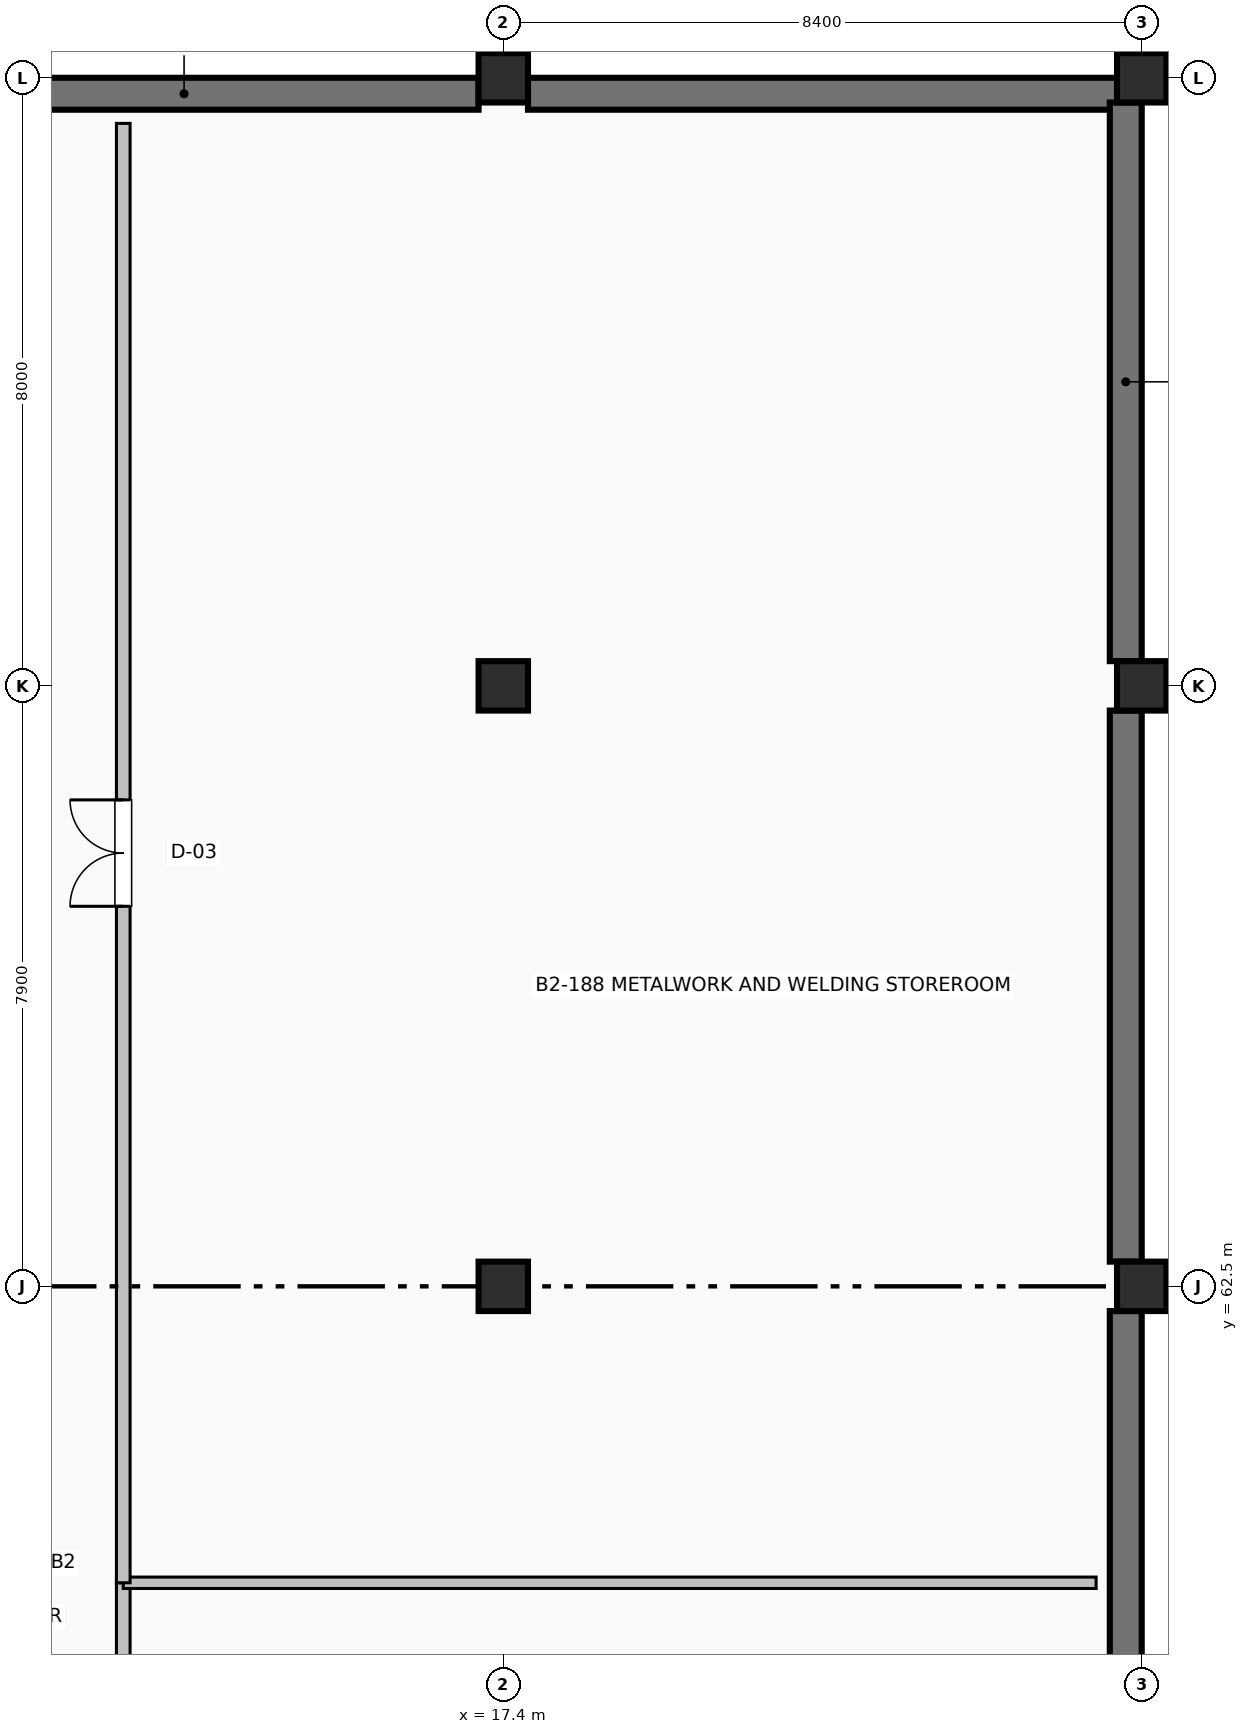
"""IFC4 building model, lengths in metres.
Left out: names, types, materials, properties, quantities, classifications, styles, units other than length and angle.
Written with IfcOpenShell. Run it as: python <this file> out.ifc"""

import sys

from ifc_helpers import new_model, si_unit, direction, frame, frame_2d, origin, origin_2d, place, context, subcontext, project, spatial, rectangle, extrude, element, fill, save


model = new_model("IFC4")
c1 = context("Model", 3, precision=1e-05, world=origin(), true_north=direction((0.0, 1.0)))
c2 = subcontext(c1, "Body", "Model", "MODEL_VIEW")
j1 = project(units=[si_unit("LENGTHUNIT", "METRE"), si_unit("PLANEANGLEUNIT", "RADIAN")], contexts=[c1])
p1 = place(None, origin())
s1 = spatial("IfcSite", under=j1, at=p1, CompositionType="ELEMENT")
p2 = place(p1, origin())
s2 = spatial("IfcBuilding", under=s1, at=p2, CompositionType="ELEMENT")
p3 = place(p2, frame((0.0, 0.0, -9.6)))
s3 = spatial("IfcBuildingStorey", under=s2, at=p3, CompositionType="ELEMENT", Elevation=-9.6)
for number, where, z_axis, x_axis in (
    (1, (17.4, 62.5, 0.0), (0.0, 0.0, 1.0), (1.0, 0.0, 0.0)),
    (2, (17.4, 70.4, 0.0), (0.0, 0.0, 1.0), (1.0, 0.0, 0.0)),
    (3, (17.4, 78.4, 0.0), (0.0, 0.0, 1.0), (1.0, 0.0, 0.0)),
    (4, (25.8, 62.5, 0.0), (0.0, 0.0, 1.0), (1.0, 0.0, 0.0)),
    (5, (25.8, 70.4, 0.0), (0.0, 0.0, 1.0), (1.0, 0.0, 0.0)),
    (6, (25.8, 78.4, 0.0), (0.0, 0.0, 1.0), (1.0, 0.0, 0.0)),
):
    element("IfcColumn", number, at=place(p3, frame(where, z_axis=z_axis, x_axis=x_axis)), inside=s3, PredefinedType="COLUMN", context=c2, shape_type="SweptSolid", body=[
        extrude(rectangle(XDim=0.65, YDim=0.65, at=origin_2d()), origin(), (0.0, 0.0, 1.0), 4.8),
    ])
for number, where, z_axis, x_axis in (
    (7, (9.325, 78.19, 0.0), (0.0, 0.0, 1.0), (1.0, 0.0, 0.0)),
    (8, (17.725, 78.19, 0.0), (0.0, 0.0, 1.0), (1.0, 0.0, 0.0)),
):
    element("IfcWall", number, at=place(p3, frame(where, z_axis=z_axis, x_axis=x_axis)), inside=s3, PredefinedType="SHEAR", context=c2, shape_type="SweptSolid", body=[
        extrude(rectangle(XDim=7.75, YDim=0.42, at=frame_2d((3.875, 0.0))), origin(), (0.0, 0.0, 1.0), 4.5),
    ])
p4 = place(p3, frame((25.59, 78.075, 0.0), z_axis=(0.0, 0.0, 1.0), x_axis=(0.0, -1.0, 0.0)))
e9 = element("IfcWall", 9, at=p4, inside=s3, PredefinedType="SHEAR", context=c2, shape_type="SweptSolid", body=[
    extrude(rectangle(XDim=7.35, YDim=0.42, at=frame_2d((3.675, 0.0))), origin(), (0.0, 0.0, 1.0), 4.5),
])
for number, where, z_axis, x_axis in (
    (10, (25.59, 70.075, 0.0), (0.0, 0.0, 1.0), (0.0, -1.0, 0.0)),
    (11, (25.59, 62.175, 0.0), (0.0, 0.0, 1.0), (0.0, -1.0, 0.0)),
):
    element("IfcWall", number, at=place(p3, frame(where, z_axis=z_axis, x_axis=x_axis)), inside=s3, PredefinedType="SHEAR", context=c2, shape_type="SweptSolid", body=[
        extrude(rectangle(XDim=7.25, YDim=0.42, at=frame_2d((3.625, 0.0))), origin(), (0.0, 0.0, 1.0), 4.5),
    ])
p5 = place(p3, frame((12.4, 39.4, 0.0), z_axis=(0.0, 0.0, 1.0), x_axis=(0.0, 1.0, 0.0)))
e12 = element("IfcWall", 12, at=p5, inside=s3, PredefinedType="PARTITIONING", context=c2, shape_type="SweptSolid", body=[
    extrude(rectangle(XDim=19.2, YDim=0.18, at=frame_2d((9.6, 0.0))), origin(), (0.0, 0.0, 1.0), 4.492),
])
p6 = place(p5, frame((8.74, 0.0, 0.0)))
e13 = element("IfcOpeningElement", 13, at=p6, cuts=e12, PredefinedType="OPENING", context=c2, shape_type="SweptSolid", body=[
    extrude(rectangle(XDim=1.72, YDim=2.22, at=frame_2d((0.86, 1.11))), frame((0.0, 0.1, 0.0), z_axis=(0.0, -1.0, 0.0), x_axis=(1.0, 0.0, 0.0)), (0.0, 0.0, 1.0), 0.2),
])
p7 = place(p3, frame((12.4, 58.6, 0.0), z_axis=(0.0, 0.0, 1.0), x_axis=(1.0, 0.0, 0.0)))
e14 = element("IfcWall", 14, at=p7, inside=s3, PredefinedType="PARTITIONING", context=c2, shape_type="SweptSolid", body=[
    extrude(rectangle(XDim=12.8, YDim=0.15, at=frame_2d((6.4, 0.0))), origin(), (0.0, 0.0, 1.0), 3.892),
])
p8 = place(p3, frame((12.4, 58.6, 0.0), z_axis=(0.0, 0.0, 1.0), x_axis=(0.0, 1.0, 0.0)))
e15 = element("IfcWall", 15, at=p8, inside=s3, PredefinedType="PARTITIONING", context=c2, shape_type="SweptSolid", body=[
    extrude(rectangle(XDim=19.2, YDim=0.18, at=frame_2d((9.6, 0.0))), origin(), (0.0, 0.0, 1.0), 4.492),
])
p9 = place(p8, frame((8.9, 0.0, 0.0)))
e16 = element("IfcOpeningElement", 16, at=p9, cuts=e15, PredefinedType="OPENING", context=c2, shape_type="SweptSolid", body=[
    extrude(rectangle(XDim=1.4, YDim=2.12, at=frame_2d((0.7, 1.06))), frame((0.0, 0.1, 0.0), z_axis=(0.0, -1.0, 0.0), x_axis=(1.0, 0.0, 0.0)), (0.0, 0.0, 1.0), 0.2),
])
p10 = place(p9, origin())
e17 = element("IfcDoor", 17, at=p10, inside=s3, OperationType="DOUBLE_DOOR_SINGLE_SWING", PredefinedType="DOOR", context=c2, shape_type="SweptSolid", body=[
    extrude(rectangle(XDim=1.4, YDim=2.12, at=frame_2d((0.7, 1.06))), frame((0.0, 0.025, 0.0), z_axis=(0.0, -1.0, 0.0), x_axis=(1.0, 0.0, 0.0)), (0.0, 0.0, 1.0), 0.05),
])
fill(e16, e17)
save(model, sys.argv[1])
